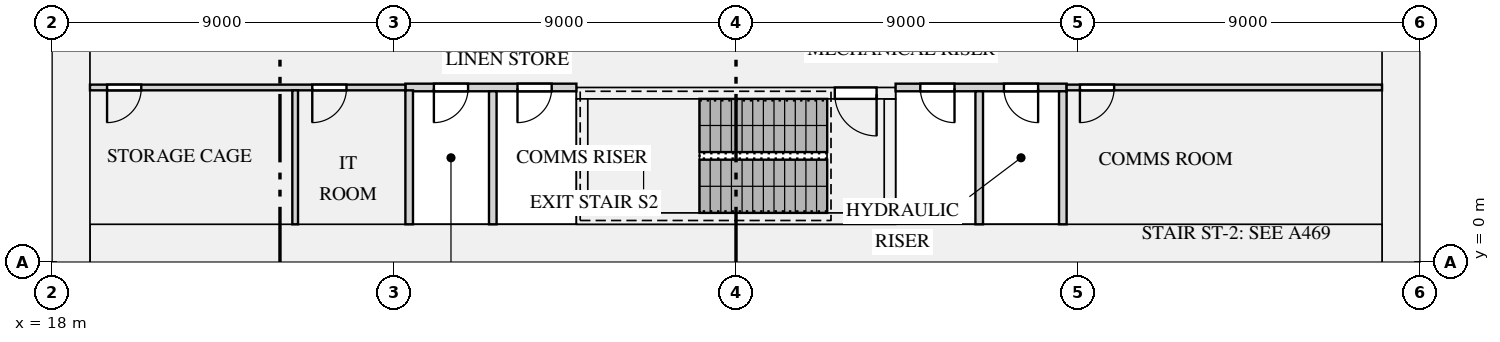
"""IFC4 building model, lengths in metres.
Left out: names, types, materials, properties, quantities, classifications, styles, units other than length and angle.
Written with IfcOpenShell. Run it as: python <this file> out.ifc"""

import sys

from ifc_helpers import new_model, si_unit, direction, frame, frame_2d, origin, place, context, subcontext, project, spatial, rectangle, extrude, element, fill, save


model = new_model("IFC4")
c1 = context("Model", 3, precision=1e-05, world=origin(), true_north=direction((0.0, 1.0)))
c2 = subcontext(c1, "Body", "Model", "MODEL_VIEW")
j1 = project(units=[si_unit("LENGTHUNIT", "METRE"), si_unit("PLANEANGLEUNIT", "RADIAN")], contexts=[c1])
p1 = place(None, origin())
s1 = spatial("IfcSite", under=j1, at=p1, CompositionType="ELEMENT")
p2 = place(p1, origin())
s2 = spatial("IfcBuilding", under=s1, at=p2, CompositionType="ELEMENT")
p3 = place(p2, frame((0.0, 0.0, 6.5)))
s3 = spatial("IfcBuildingStorey", under=s2, at=p3, CompositionType="ELEMENT", Elevation=6.5)
for number, where, z_axis, x_axis in (
    (1, (18.5, 0.0, 0.0), (0.0, 0.0, 1.0), (0.0, 1.0, 0.0)),
    (2, (53.5, 0.0, 0.0), (0.0, 0.0, 1.0), (0.0, 1.0, 0.0)),
):
    element("IfcWall", number, at=place(p3, frame(where, z_axis=z_axis, x_axis=x_axis)), inside=s3, PredefinedType="SHEAR", context=c2, shape_type="SweptSolid", body=[
        extrude(rectangle(XDim=12.5, YDim=1.0, at=frame_2d((6.25, 0.0))), origin(), (0.0, 0.0, 1.0), 4.5),
    ])
p4 = place(p3, frame((19.0, 0.5, 0.0), z_axis=(0.0, 0.0, 1.0), x_axis=(1.0, 0.0, 0.0)))
e3 = element("IfcWall", 3, at=p4, inside=s3, PredefinedType="SHEAR", context=c2, shape_type="SweptSolid", body=[
    extrude(rectangle(XDim=34.0, YDim=1.0, at=frame_2d((17.0, 0.0))), origin(), (0.0, 0.0, 1.0), 4.5),
])
p5 = place(p3, frame((31.8, 1.15, 0.0), z_axis=(0.0, 0.0, 1.0), x_axis=(1.0, 0.0, 0.0)))
e4 = element("IfcWall", 4, at=p5, inside=s3, PredefinedType="SHEAR", context=c2, shape_type="SweptSolid", body=[
    extrude(rectangle(XDim=8.4, YDim=0.3, at=frame_2d((4.2, 0.0))), origin(), (0.0, 0.0, 1.0), 4.5),
])
p6 = place(p3, frame((31.8, 4.45, 0.0), z_axis=(0.0, 0.0, 1.0), x_axis=(1.0, 0.0, 0.0)))
e5 = element("IfcWall", 5, at=p6, inside=s3, PredefinedType="SHEAR", context=c2, shape_type="SweptSolid", body=[
    extrude(rectangle(XDim=8.4, YDim=0.3, at=frame_2d((4.2, 0.0))), origin(), (0.0, 0.0, 1.0), 4.5),
])
p7 = place(p6, frame((6.8, 0.0, 0.0)))
e6 = element("IfcOpeningElement", 6, at=p7, cuts=e5, PredefinedType="OPENING", context=c2, shape_type="SweptSolid", body=[
    extrude(rectangle(XDim=1.1, YDim=2.1, at=frame_2d((0.55, 1.05))), frame((0.0, 0.16, 0.0), z_axis=(0.0, -1.0, 0.0), x_axis=(1.0, 0.0, 0.0)), (0.0, 0.0, 1.0), 0.32),
])
for number, where, z_axis, x_axis in (
    (7, (31.95, 1.3, 0.0), (0.0, 0.0, 1.0), (0.0, 1.0, 0.0)),
    (8, (40.05, 1.3, 0.0), (0.0, 0.0, 1.0), (0.0, 1.0, 0.0)),
):
    element("IfcWall", number, at=place(p3, frame(where, z_axis=z_axis, x_axis=x_axis)), inside=s3, PredefinedType="SHEAR", context=c2, shape_type="SweptSolid", body=[
        extrude(rectangle(XDim=3.0, YDim=0.3, at=frame_2d((1.5, 0.0))), origin(), (0.0, 0.0, 1.0), 4.5),
    ])
p8 = place(p3, frame((27.3, 4.6, 0.0), z_axis=(0.0, 0.0, 1.0), x_axis=(1.0, 0.0, 0.0)))
e9 = element("IfcWall", 9, at=p8, inside=s3, PredefinedType="PARTITIONING", context=c2, shape_type="SweptSolid", body=[
    extrude(rectangle(XDim=4.5, YDim=0.2, at=frame_2d((2.25, 0.0))), origin(), (0.0, 0.0, 1.0), 4.098),
])
p9 = place(p8, frame((0.75, 0.0, 0.0)))
e10 = element("IfcOpeningElement", 10, at=p9, cuts=e9, PredefinedType="OPENING", context=c2, shape_type="SweptSolid", body=[
    extrude(rectangle(XDim=0.9, YDim=2.1, at=frame_2d((0.45, 1.05))), frame((0.0, 0.11, 0.0), z_axis=(0.0, -1.0, 0.0), x_axis=(1.0, 0.0, 0.0)), (0.0, 0.0, 1.0), 0.22),
])
p10 = place(p8, frame((2.95, 0.0, 0.0)))
e11 = element("IfcOpeningElement", 11, at=p10, cuts=e9, PredefinedType="OPENING", context=c2, shape_type="SweptSolid", body=[
    extrude(rectangle(XDim=0.9, YDim=2.1, at=frame_2d((0.45, 1.05))), frame((0.0, 0.11, 0.0), z_axis=(0.0, -1.0, 0.0), x_axis=(1.0, 0.0, 0.0)), (0.0, 0.0, 1.0), 0.22),
])
p11 = place(p3, frame((40.2, 4.6, 0.0), z_axis=(0.0, 0.0, 1.0), x_axis=(1.0, 0.0, 0.0)))
e12 = element("IfcWall", 12, at=p11, inside=s3, PredefinedType="PARTITIONING", context=c2, shape_type="SweptSolid", body=[
    extrude(rectangle(XDim=4.5, YDim=0.2, at=frame_2d((2.25, 0.0))), origin(), (0.0, 0.0, 1.0), 4.098),
])
p12 = place(p11, frame((0.65, 0.0, 0.0)))
e13 = element("IfcOpeningElement", 13, at=p12, cuts=e12, PredefinedType="OPENING", context=c2, shape_type="SweptSolid", body=[
    extrude(rectangle(XDim=0.9, YDim=2.1, at=frame_2d((0.45, 1.05))), frame((0.0, 0.11, 0.0), z_axis=(0.0, -1.0, 0.0), x_axis=(1.0, 0.0, 0.0)), (0.0, 0.0, 1.0), 0.22),
])
p13 = place(p11, frame((2.85, 0.0, 0.0)))
e14 = element("IfcOpeningElement", 14, at=p13, cuts=e12, PredefinedType="OPENING", context=c2, shape_type="SweptSolid", body=[
    extrude(rectangle(XDim=0.9, YDim=2.1, at=frame_2d((0.45, 1.05))), frame((0.0, 0.11, 0.0), z_axis=(0.0, -1.0, 0.0), x_axis=(1.0, 0.0, 0.0)), (0.0, 0.0, 1.0), 0.22),
])
p14 = place(p3, frame((19.0, 4.6, 0.0), z_axis=(0.0, 0.0, 1.0), x_axis=(1.0, 0.0, 0.0)))
e15 = element("IfcWall", 15, at=p14, inside=s3, PredefinedType="PARTITIONING", context=c2, shape_type="SweptSolid", body=[
    extrude(rectangle(XDim=8.3, YDim=0.15, at=frame_2d((4.15, 0.0))), origin(), (0.0, 0.0, 1.0), 4.098),
])
p15 = place(p14, frame((0.45, 0.0, 0.0)))
e16 = element("IfcOpeningElement", 16, at=p15, cuts=e15, PredefinedType="OPENING", context=c2, shape_type="SweptSolid", body=[
    extrude(rectangle(XDim=0.9, YDim=2.1, at=frame_2d((0.45, 1.05))), frame((0.0, 0.085, 0.0), z_axis=(0.0, -1.0, 0.0), x_axis=(1.0, 0.0, 0.0)), (0.0, 0.0, 1.0), 0.17),
])
p16 = place(p14, frame((5.85, 0.0, 0.0)))
e17 = element("IfcOpeningElement", 17, at=p16, cuts=e15, PredefinedType="OPENING", context=c2, shape_type="SweptSolid", body=[
    extrude(rectangle(XDim=0.9, YDim=2.1, at=frame_2d((0.45, 1.05))), frame((0.0, 0.085, 0.0), z_axis=(0.0, -1.0, 0.0), x_axis=(1.0, 0.0, 0.0)), (0.0, 0.0, 1.0), 0.17),
])
p17 = place(p3, frame((44.7, 4.6, 0.0), z_axis=(0.0, 0.0, 1.0), x_axis=(1.0, 0.0, 0.0)))
e18 = element("IfcWall", 18, at=p17, inside=s3, PredefinedType="PARTITIONING", context=c2, shape_type="SweptSolid", body=[
    extrude(rectangle(XDim=8.3, YDim=0.15, at=frame_2d((4.15, 0.0))), origin(), (0.0, 0.0, 1.0), 4.098),
])
p18 = place(p17, frame((0.35, 0.0, 0.0)))
e19 = element("IfcOpeningElement", 19, at=p18, cuts=e18, PredefinedType="OPENING", context=c2, shape_type="SweptSolid", body=[
    extrude(rectangle(XDim=0.9, YDim=2.1, at=frame_2d((0.45, 1.05))), frame((0.0, 0.085, 0.0), z_axis=(0.0, -1.0, 0.0), x_axis=(1.0, 0.0, 0.0)), (0.0, 0.0, 1.0), 0.17),
])
p19 = place(p3, frame((24.4, 1.0, 0.0), z_axis=(0.0, 0.0, 1.0), x_axis=(0.0, 1.0, 0.0)))
e20 = element("IfcWall", 20, at=p19, inside=s3, PredefinedType="PARTITIONING", context=c2, shape_type="SweptSolid", body=[
    extrude(rectangle(XDim=3.525, YDim=0.15, at=frame_2d((1.762, 0.0))), origin(), (0.0, 0.0, 1.0), 4.098),
])
p20 = place(p3, frame((27.4, 1.0, 0.0), z_axis=(0.0, 0.0, 1.0), x_axis=(0.0, 1.0, 0.0)))
e21 = element("IfcWall", 21, at=p20, inside=s3, PredefinedType="PARTITIONING", context=c2, shape_type="SweptSolid", body=[
    extrude(rectangle(XDim=3.525, YDim=0.2, at=frame_2d((1.762, 0.0))), origin(), (0.0, 0.0, 1.0), 4.098),
])
for number, where, z_axis, x_axis in (
    (22, (29.6, 1.0, 0.0), (0.0, 0.0, 1.0), (0.0, 1.0, 0.0)),
    (23, (42.4, 1.0, 0.0), (0.0, 0.0, 1.0), (0.0, 1.0, 0.0)),
    (24, (44.6, 1.0, 0.0), (0.0, 0.0, 1.0), (0.0, 1.0, 0.0)),
):
    element("IfcWall", number, at=place(p3, frame(where, z_axis=z_axis, x_axis=x_axis)), inside=s3, PredefinedType="PARTITIONING", context=c2, shape_type="SweptSolid", body=[
        extrude(rectangle(XDim=3.5, YDim=0.2, at=frame_2d((1.75, 0.0))), origin(), (0.0, 0.0, 1.0), 4.098),
    ])
p21 = place(p7, frame((1.1, 0.0, 0.0), z_axis=(0.0, 0.0, 1.0), x_axis=(-1.0, 0.0, 0.0)))
e25 = element("IfcDoor", 25, at=p21, inside=s3, OperationType="SINGLE_SWING_LEFT", PredefinedType="DOOR", context=c2, shape_type="SweptSolid", body=[
    extrude(rectangle(XDim=1.1, YDim=2.1, at=frame_2d((0.55, 1.05))), frame((0.0, 0.025, 0.0), z_axis=(0.0, -1.0, 0.0), x_axis=(1.0, 0.0, 0.0)), (0.0, 0.0, 1.0), 0.05),
])
fill(e6, e25)
p22 = place(p15, frame((0.9, 0.0, 0.0), z_axis=(0.0, 0.0, 1.0), x_axis=(-1.0, 0.0, 0.0)))
e26 = element("IfcDoor", 26, at=p22, inside=s3, OperationType="SINGLE_SWING_RIGHT", PredefinedType="DOOR", context=c2, shape_type="SweptSolid", body=[
    extrude(rectangle(XDim=0.9, YDim=2.1, at=frame_2d((0.45, 1.05))), frame((0.0, 0.025, 0.0), z_axis=(0.0, -1.0, 0.0), x_axis=(1.0, 0.0, 0.0)), (0.0, 0.0, 1.0), 0.05),
])
fill(e16, e26)
p23 = place(p16, frame((0.9, 0.0, 0.0), z_axis=(0.0, 0.0, 1.0), x_axis=(-1.0, 0.0, 0.0)))
e27 = element("IfcDoor", 27, at=p23, inside=s3, OperationType="SINGLE_SWING_RIGHT", PredefinedType="DOOR", context=c2, shape_type="SweptSolid", body=[
    extrude(rectangle(XDim=0.9, YDim=2.1, at=frame_2d((0.45, 1.05))), frame((0.0, 0.025, 0.0), z_axis=(0.0, -1.0, 0.0), x_axis=(1.0, 0.0, 0.0)), (0.0, 0.0, 1.0), 0.05),
])
fill(e17, e27)
p24 = place(p18, frame((0.9, 0.0, 0.0), z_axis=(0.0, 0.0, 1.0), x_axis=(-1.0, 0.0, 0.0)))
e28 = element("IfcDoor", 28, at=p24, inside=s3, OperationType="SINGLE_SWING_RIGHT", PredefinedType="DOOR", context=c2, shape_type="SweptSolid", body=[
    extrude(rectangle(XDim=0.9, YDim=2.1, at=frame_2d((0.45, 1.05))), frame((0.0, 0.025, 0.0), z_axis=(0.0, -1.0, 0.0), x_axis=(1.0, 0.0, 0.0)), (0.0, 0.0, 1.0), 0.05),
])
fill(e19, e28)
p25 = place(p9, frame((0.9, 0.0, 0.0), z_axis=(0.0, 0.0, 1.0), x_axis=(-1.0, 0.0, 0.0)))
e29 = element("IfcDoor", 29, at=p25, inside=s3, OperationType="SINGLE_SWING_RIGHT", PredefinedType="DOOR", context=c2, shape_type="SweptSolid", body=[
    extrude(rectangle(XDim=0.9, YDim=2.1, at=frame_2d((0.45, 1.05))), frame((0.0, 0.025, 0.0), z_axis=(0.0, -1.0, 0.0), x_axis=(1.0, 0.0, 0.0)), (0.0, 0.0, 1.0), 0.05),
])
fill(e10, e29)
p26 = place(p10, frame((0.9, 0.0, 0.0), z_axis=(0.0, 0.0, 1.0), x_axis=(-1.0, 0.0, 0.0)))
e30 = element("IfcDoor", 30, at=p26, inside=s3, OperationType="SINGLE_SWING_RIGHT", PredefinedType="DOOR", context=c2, shape_type="SweptSolid", body=[
    extrude(rectangle(XDim=0.9, YDim=2.1, at=frame_2d((0.45, 1.05))), frame((0.0, 0.025, 0.0), z_axis=(0.0, -1.0, 0.0), x_axis=(1.0, 0.0, 0.0)), (0.0, 0.0, 1.0), 0.05),
])
fill(e11, e30)
p27 = place(p12, frame((0.9, 0.0, 0.0), z_axis=(0.0, 0.0, 1.0), x_axis=(-1.0, 0.0, 0.0)))
e31 = element("IfcDoor", 31, at=p27, inside=s3, OperationType="SINGLE_SWING_LEFT", PredefinedType="DOOR", context=c2, shape_type="SweptSolid", body=[
    extrude(rectangle(XDim=0.9, YDim=2.1, at=frame_2d((0.45, 1.05))), frame((0.0, 0.025, 0.0), z_axis=(0.0, -1.0, 0.0), x_axis=(1.0, 0.0, 0.0)), (0.0, 0.0, 1.0), 0.05),
])
fill(e13, e31)
p28 = place(p13, frame((0.9, 0.0, 0.0), z_axis=(0.0, 0.0, 1.0), x_axis=(-1.0, 0.0, 0.0)))
e32 = element("IfcDoor", 32, at=p28, inside=s3, OperationType="SINGLE_SWING_LEFT", PredefinedType="DOOR", context=c2, shape_type="SweptSolid", body=[
    extrude(rectangle(XDim=0.9, YDim=2.1, at=frame_2d((0.45, 1.05))), frame((0.0, 0.025, 0.0), z_axis=(0.0, -1.0, 0.0), x_axis=(1.0, 0.0, 0.0)), (0.0, 0.0, 1.0), 0.05),
])
fill(e14, e32)
save(model, sys.argv[1])
